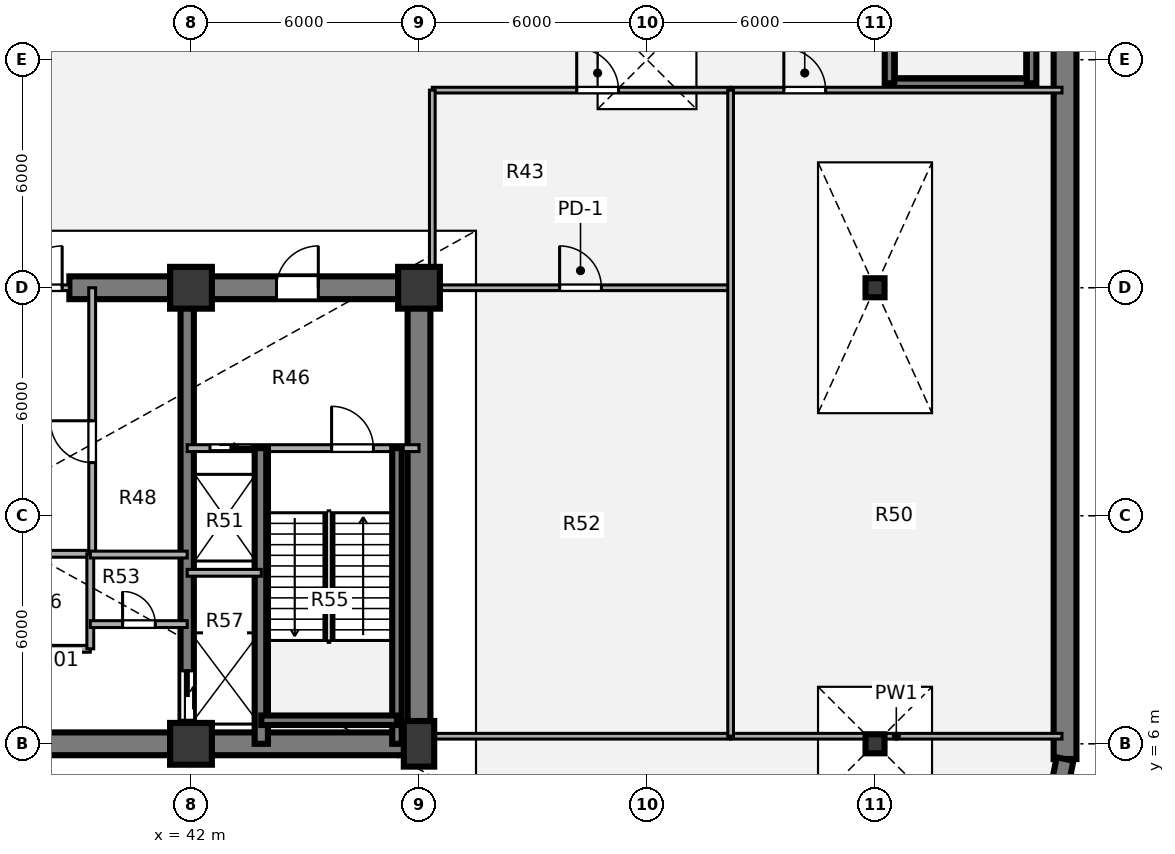
"""IFC4 building model, lengths in metres.
Left out: names, types, materials, properties, quantities, classifications, styles, units other than length and angle.
Written with IfcOpenShell. Run it as: python <this file> out.ifc"""

import sys

from ifc_helpers import new_model, si_unit, direction, frame, frame_2d, origin, origin_2d, place, context, subcontext, project, spatial, rectangle, i_section, extrude, source, transform, mapped, element, fill, save


model = new_model("IFC4")
c1 = context("Model", 3, precision=1e-05, world=origin(), true_north=direction((0.0, 1.0)))
c2 = subcontext(c1, "Body", "Model", "MODEL_VIEW")
j1 = project(units=[si_unit("LENGTHUNIT", "METRE"), si_unit("PLANEANGLEUNIT", "RADIAN")], contexts=[c1])
p1 = place(None, origin())
s1 = spatial("IfcSite", under=j1, at=p1, CompositionType="ELEMENT")
p2 = place(p1, origin())
s2 = spatial("IfcBuilding", under=s1, at=p2, CompositionType="ELEMENT")
p3 = place(p2, frame((0.0, 0.0, -4.86)))
s3 = spatial("IfcBuildingStorey", under=s2, at=p3, CompositionType="ELEMENT", Elevation=-4.86)
m1 = source(origin(), c2, "Body", "SweptSolid", [
    extrude(rectangle(XDim=1.1, YDim=1.1, at=origin_2d()), origin(), (0.0, 0.0, 1.0), 4.86),
])
p4 = place(p3, frame((42.0, 6.0, 0.0), z_axis=(0.0, 0.0, 1.0), x_axis=(1.0, 0.0, 0.0)))
e1 = element("IfcColumn", 1, at=p4, inside=s3, PredefinedType="COLUMN", context=c2, shape_type="MappedRepresentation", body=[
    mapped(m1, transform((0.0, 0.0, 0.0), x_axis=(1.0, 0.0, 0.0), y_axis=(0.0, 1.0, 0.0), z_axis=(0.0, 0.0, 1.0), scale=1.0)),
])
m2 = source(origin(), c2, "Body", "SweptSolid", [
    extrude(rectangle(XDim=0.8, YDim=1.2, at=origin_2d()), origin(), (0.0, 0.0, 1.0), 4.86),
])
p5 = place(p3, frame((48.0, 6.0, 0.0), z_axis=(0.0, 0.0, 1.0), x_axis=(1.0, 0.0, 0.0)))
e2 = element("IfcColumn", 2, at=p5, inside=s3, PredefinedType="COLUMN", context=c2, shape_type="MappedRepresentation", body=[
    mapped(m2, transform((0.0, 0.0, 0.0), x_axis=(1.0, 0.0, 0.0), y_axis=(0.0, 1.0, 0.0), z_axis=(0.0, 0.0, 1.0), scale=1.0)),
])
for number, where, z_axis, x_axis in (
    (3, (42.0, 18.0, 0.0), (0.0, 0.0, 1.0), (1.0, 0.0, 0.0)),
    (4, (48.0, 18.0, 0.0), (0.0, 0.0, 1.0), (1.0, 0.0, 0.0)),
):
    element("IfcColumn", number, at=place(p3, frame(where, z_axis=z_axis, x_axis=x_axis)), inside=s3, PredefinedType="COLUMN", context=c2, shape_type="MappedRepresentation", body=[
        mapped(m1, transform((0.0, 0.0, 0.0), x_axis=(1.0, 0.0, 0.0), y_axis=(0.0, 1.0, 0.0), z_axis=(0.0, 0.0, 1.0), scale=1.0)),
    ])
p6 = place(p3, frame((48.3, 6.0, 0.0), z_axis=(0.0, 0.0, 1.0), x_axis=(-1.0, 0.0, 0.0)))
e5 = element("IfcWall", 5, at=p6, inside=s3, PredefinedType="SHEAR", context=c2, shape_type="SweptSolid", body=[
    extrude(rectangle(XDim=24.6, YDim=0.6, at=frame_2d((12.3, 0.0))), origin(), (0.0, 0.0, 1.0), 4.86),
])
p7 = place(p3, frame((48.0, 18.0, 0.0), z_axis=(0.0, 0.0, 1.0), x_axis=(0.0, -1.0, 0.0)))
e6 = element("IfcWall", 6, at=p7, inside=s3, PredefinedType="SHEAR", context=c2, shape_type="SweptSolid", body=[
    extrude(rectangle(XDim=12.0, YDim=0.6, at=frame_2d((6.0, 0.0))), origin(), (0.0, 0.0, 1.0), 4.86),
])
p8 = place(p3, frame((38.8, 18.0, 0.0), z_axis=(0.0, 0.0, 1.0), x_axis=(1.0, 0.0, 0.0)))
e7 = element("IfcWall", 7, at=p8, inside=s3, PredefinedType="SHEAR", context=c2, shape_type="SweptSolid", body=[
    extrude(rectangle(XDim=9.5, YDim=0.6, at=frame_2d((4.75, 0.0))), origin(), (0.0, 0.0, 1.0), 4.86),
])
p9 = place(p8, frame((5.45, 0.0, 0.0)))
e8 = element("IfcOpeningElement", 8, at=p9, cuts=e7, PredefinedType="OPENING", context=c2, shape_type="SweptSolid", body=[
    extrude(rectangle(XDim=1.1, YDim=2.1, at=origin_2d()), frame((0.55, 0.31, 1.05), z_axis=(0.0, -1.0, 0.0), x_axis=(1.0, 0.0, 0.0)), (0.0, 0.0, 1.0), 0.62),
])
p10 = place(p3, frame((41.9, 18.0, 0.0), z_axis=(0.0, 0.0, 1.0), x_axis=(0.0, -1.0, 0.0)))
e9 = element("IfcWall", 9, at=p10, inside=s3, PredefinedType="SHEAR", context=c2, shape_type="SweptSolid", body=[
    extrude(rectangle(XDim=12.0, YDim=0.35, at=frame_2d((6.0, 0.0))), origin(), (0.0, 0.0, 1.0), 4.86),
])
p11 = place(p10, frame((10.08, 0.0, 0.0)))
e10 = element("IfcOpeningElement", 10, at=p11, cuts=e9, PredefinedType="OPENING", context=c2, shape_type="SweptSolid", body=[
    extrude(rectangle(XDim=1.3, YDim=2.1, at=origin_2d()), frame((0.65, 0.185, 1.05), z_axis=(0.0, -1.0, 0.0), x_axis=(1.0, 0.0, 0.0)), (0.0, 0.0, 1.0), 0.37),
])
p12 = place(p3, frame((65.0, 55.4, 0.0), z_axis=(0.0, 0.0, 1.0), x_axis=(0.0, -1.0, 0.0)))
e11 = element("IfcWall", 11, at=p12, inside=s3, PredefinedType="USERDEFINED", context=c2, shape_type="SweptSolid", body=[
    extrude(rectangle(XDim=49.8, YDim=0.6, at=frame_2d((24.9, 0.0))), origin(), (0.0, 0.0, 1.0), 4.86),
])
p13 = place(p3, frame((65.0, 5.6, 0.0), z_axis=(0.0, 0.0, 1.0), x_axis=(-0.195138390419, -0.980775717779, 0.0)))
e12 = element("IfcWall", 12, at=p13, inside=s3, PredefinedType="USERDEFINED", context=c2, shape_type="SweptSolid", body=[
    extrude(rectangle(XDim=1.249, YDim=0.45, at=frame_2d((0.624, 0.0))), origin(), (0.0, 0.0, 1.0), 4.86),
])
m3 = source(origin(), c2, "Body", "SweptSolid", [
    extrude(i_section(OverallWidth=0.5, OverallDepth=0.5, WebThickness=0.028, FlangeThickness=0.045, at=origin_2d()), origin(), (0.0, 0.0, 1.0), 4.86),
])
for number, where, z_axis, x_axis in (
    (13, (60.0, 6.0, 0.0), (0.0, 0.0, 1.0), (1.0, 0.0, 0.0)),
    (14, (60.0, 18.0, 0.0), (0.0, 0.0, 1.0), (1.0, 0.0, 0.0)),
):
    element("IfcColumn", number, at=place(p3, frame(where, z_axis=z_axis, x_axis=x_axis)), inside=s3, PredefinedType="COLUMN", context=c2, shape_type="MappedRepresentation", body=[
        mapped(m3, transform((0.0, 0.0, 0.0), x_axis=(1.0, 0.0, 0.0), y_axis=(0.0, 1.0, 0.0), z_axis=(0.0, 0.0, 1.0), scale=1.0)),
    ])
p14 = place(p3, frame((60.38, 23.38, 0.0), z_axis=(0.0, 0.0, 1.0), x_axis=(1.0, 0.0, 0.0)))
e15 = element("IfcWall", 15, at=p14, inside=s3, PredefinedType="SHEAR", context=c2, shape_type="SweptSolid", body=[
    extrude(rectangle(XDim=3.74, YDim=0.25, at=frame_2d((1.87, 0.0))), origin(), (0.0, 0.0, 1.0), 4.86),
])
for number, where, z_axis, x_axis in (
    (16, (60.38, 23.38, 0.0), (0.0, 0.0, 1.0), (0.0, 1.0, 0.0)),
    (17, (64.12, 23.38, 0.0), (0.0, 0.0, 1.0), (0.0, 1.0, 0.0)),
):
    element("IfcWall", number, at=place(p3, frame(where, z_axis=z_axis, x_axis=x_axis)), inside=s3, PredefinedType="SHEAR", context=c2, shape_type="SweptSolid", body=[
        extrude(rectangle(XDim=7.47, YDim=0.25, at=frame_2d((3.735, 0.0))), origin(), (0.0, 0.0, 1.0), 4.86),
    ])
p15 = place(p3, frame((34.2, 11.0, 0.0), z_axis=(0.0, 0.0, 1.0), x_axis=(1.0, 0.0, 0.0)))
e18 = element("IfcWall", 18, at=p15, inside=s3, PredefinedType="PARTITIONING", context=c2, shape_type="SweptSolid", body=[
    extrude(rectangle(XDim=5.15, YDim=0.18, at=frame_2d((2.575, 0.0))), origin(), (0.0, 0.0, 1.0), 4.51),
])
p16 = place(p15, frame((2.0, 0.0, 0.0)))
e19 = element("IfcOpeningElement", 19, at=p16, cuts=e18, PredefinedType="OPENING", context=c2, shape_type="SweptSolid", body=[
    extrude(rectangle(XDim=1.1, YDim=2.1, at=origin_2d()), frame((0.55, 0.1, 1.05), z_axis=(0.0, -1.0, 0.0), x_axis=(1.0, 0.0, 0.0)), (0.0, 0.0, 1.0), 0.2),
])
p17 = place(p3, frame((34.2, 8.5, 0.0), z_axis=(0.0, 0.0, 1.0), x_axis=(1.0, 0.0, 0.0)))
e20 = element("IfcWall", 20, at=p17, inside=s3, PredefinedType="PARTITIONING", context=c2, shape_type="SweptSolid", body=[
    extrude(rectangle(XDim=5.15, YDim=0.18, at=frame_2d((2.575, 0.0))), origin(), (0.0, 0.0, 1.0), 4.51),
])
p18 = place(p3, frame((39.35, 8.5, 0.0), z_axis=(0.0, 0.0, 1.0), x_axis=(0.0, 1.0, 0.0)))
e21 = element("IfcWall", 21, at=p18, inside=s3, PredefinedType="PARTITIONING", context=c2, shape_type="SweptSolid", body=[
    extrude(rectangle(XDim=2.5, YDim=0.18, at=frame_2d((1.25, 0.0))), origin(), (0.0, 0.0, 1.0), 4.51),
])
p19 = place(p3, frame((39.4, 11.0, 0.0), z_axis=(0.0, 0.0, 1.0), x_axis=(0.0, 1.0, 0.0)))
e22 = element("IfcWall", 22, at=p19, inside=s3, PredefinedType="PARTITIONING", context=c2, shape_type="SweptSolid", body=[
    extrude(rectangle(XDim=7.0, YDim=0.18, at=frame_2d((3.5, 0.0))), origin(), (0.0, 0.0, 1.0), 4.51),
])
p20 = place(p19, frame((2.4, 0.0, 0.0)))
e23 = element("IfcOpeningElement", 23, at=p20, cuts=e22, PredefinedType="OPENING", context=c2, shape_type="SweptSolid", body=[
    extrude(rectangle(XDim=1.1, YDim=2.1, at=origin_2d()), frame((0.55, 0.1, 1.05), z_axis=(0.0, -1.0, 0.0), x_axis=(1.0, 0.0, 0.0)), (0.0, 0.0, 1.0), 0.2),
])
p21 = place(p3, frame((39.35, 10.98, 0.0), z_axis=(0.0, 0.0, 1.0), x_axis=(1.0, 0.0, 0.0)))
e24 = element("IfcWall", 24, at=p21, inside=s3, PredefinedType="PARTITIONING", context=c2, shape_type="SweptSolid", body=[
    extrude(rectangle(XDim=2.55, YDim=0.18, at=frame_2d((1.275, 0.0))), origin(), (0.0, 0.0, 1.0), 4.51),
])
p22 = place(p3, frame((39.35, 9.15, 0.0), z_axis=(0.0, 0.0, 1.0), x_axis=(1.0, 0.0, 0.0)))
e25 = element("IfcWall", 25, at=p22, inside=s3, PredefinedType="PARTITIONING", context=c2, shape_type="SweptSolid", body=[
    extrude(rectangle(XDim=2.55, YDim=0.18, at=frame_2d((1.275, 0.0))), origin(), (0.0, 0.0, 1.0), 4.51),
])
p23 = place(p22, frame((0.85, 0.0, 0.0)))
e26 = element("IfcOpeningElement", 26, at=p23, cuts=e25, PredefinedType="OPENING", context=c2, shape_type="SweptSolid", body=[
    extrude(rectangle(XDim=0.86, YDim=2.1, at=origin_2d()), frame((0.43, 0.1, 1.05), z_axis=(0.0, -1.0, 0.0), x_axis=(1.0, 0.0, 0.0)), (0.0, 0.0, 1.0), 0.2),
])
p24 = place(p3, frame((33.2, 18.0, 0.0), z_axis=(0.0, 0.0, 1.0), x_axis=(1.0, 0.0, 0.0)))
e27 = element("IfcWall", 27, at=p24, inside=s3, PredefinedType="PARTITIONING", context=c2, shape_type="SweptSolid", body=[
    extrude(rectangle(XDim=5.6, YDim=0.15, at=frame_2d((2.8, 0.0))), origin(), (0.0, 0.0, 1.0), 3.325),
])
p25 = place(p24, frame((0.19, 0.0, 0.0)))
e28 = element("IfcOpeningElement", 28, at=p25, cuts=e27, PredefinedType="OPENING", context=c2, shape_type="SweptSolid", body=[
    extrude(rectangle(XDim=1.1, YDim=2.1, at=origin_2d()), frame((0.55, 0.085, 1.05), z_axis=(0.0, -1.0, 0.0), x_axis=(1.0, 0.0, 0.0)), (0.0, 0.0, 1.0), 0.17),
])
p26 = place(p24, frame((4.31, 0.0, 0.0)))
e29 = element("IfcOpeningElement", 29, at=p26, cuts=e27, PredefinedType="OPENING", context=c2, shape_type="SweptSolid", body=[
    extrude(rectangle(XDim=1.1, YDim=2.1, at=origin_2d()), frame((0.55, 0.085, 1.05), z_axis=(0.0, -1.0, 0.0), x_axis=(1.0, 0.0, 0.0)), (0.0, 0.0, 1.0), 0.17),
])
p27 = place(p3, frame((41.9, 13.78, 0.0), z_axis=(0.0, 0.0, 1.0), x_axis=(1.0, 0.0, 0.0)))
e30 = element("IfcWall", 30, at=p27, inside=s3, PredefinedType="PARTITIONING", context=c2, shape_type="SweptSolid", body=[
    extrude(rectangle(XDim=6.1, YDim=0.18, at=frame_2d((3.05, 0.0))), origin(), (0.0, 0.0, 1.0), 4.51),
])
p28 = place(p27, frame((0.6, 0.0, 0.0)))
e31 = element("IfcOpeningElement", 31, at=p28, cuts=e30, PredefinedType="OPENING", context=c2, shape_type="SweptSolid", body=[
    extrude(rectangle(XDim=1.1, YDim=2.1, at=origin_2d()), frame((0.55, 0.1, 1.05), z_axis=(0.0, -1.0, 0.0), x_axis=(1.0, 0.0, 0.0)), (0.0, 0.0, 1.0), 0.2),
])
p29 = place(p27, frame((3.8, 0.0, 0.0)))
e32 = element("IfcOpeningElement", 32, at=p29, cuts=e30, PredefinedType="OPENING", context=c2, shape_type="SweptSolid", body=[
    extrude(rectangle(XDim=1.1, YDim=2.1, at=origin_2d()), frame((0.55, 0.1, 1.05), z_axis=(0.0, -1.0, 0.0), x_axis=(1.0, 0.0, 0.0)), (0.0, 0.0, 1.0), 0.2),
])
p30 = place(p3, frame((43.85, 6.0, 0.0), z_axis=(0.0, 0.0, 1.0), x_axis=(0.0, 1.0, 0.0)))
e33 = element("IfcWall", 33, at=p30, inside=s3, PredefinedType="SHEAR", context=c2, shape_type="SweptSolid", body=[
    extrude(rectangle(XDim=7.78, YDim=0.35, at=frame_2d((3.89, 0.0))), origin(), (0.0, 0.0, 1.0), 4.86),
])
p31 = place(p3, frame((47.42, 6.0, 0.0), z_axis=(0.0, 0.0, 1.0), x_axis=(0.0, 1.0, 0.0)))
e34 = element("IfcWall", 34, at=p31, inside=s3, PredefinedType="SHEAR", context=c2, shape_type="SweptSolid", body=[
    extrude(rectangle(XDim=7.78, YDim=0.25, at=frame_2d((3.89, 0.0))), origin(), (0.0, 0.0, 1.0), 4.86),
])
p32 = place(p3, frame((43.85, 6.62, 0.0), z_axis=(0.0, 0.0, 1.0), x_axis=(1.0, 0.0, 0.0)))
e35 = element("IfcWall", 35, at=p32, inside=s3, PredefinedType="SHEAR", context=c2, shape_type="SweptSolid", body=[
    extrude(rectangle(XDim=3.57, YDim=0.25, at=frame_2d((1.785, 0.0))), origin(), (0.0, 0.0, 1.0), 4.86),
])
p33 = place(p3, frame((41.9, 10.5, 0.0), z_axis=(0.0, 0.0, 1.0), x_axis=(1.0, 0.0, 0.0)))
e36 = element("IfcWall", 36, at=p33, inside=s3, PredefinedType="PARTITIONING", context=c2, shape_type="SweptSolid", body=[
    extrude(rectangle(XDim=1.95, YDim=0.18, at=frame_2d((0.975, 0.0))), origin(), (0.0, 0.0, 1.0), 4.51),
])
p34 = place(p3, frame((48.35, 6.2, 0.0), z_axis=(0.0, 0.0, 1.0), x_axis=(1.0, 0.0, 0.0)))
e37 = element("IfcWall", 37, at=p34, inside=s3, PredefinedType="PARTITIONING", context=c2, shape_type="SweptSolid", body=[
    extrude(rectangle(XDim=7.85, YDim=0.15, at=frame_2d((3.925, 0.0))), origin(), (0.0, 0.0, 1.0), 3.625),
])
p35 = place(p3, frame((56.2, 6.2, 0.0), z_axis=(0.0, 0.0, 1.0), x_axis=(1.0, 0.0, 0.0)))
e38 = element("IfcWall", 38, at=p35, inside=s3, PredefinedType="PARTITIONING", context=c2, shape_type="SweptSolid", body=[
    extrude(rectangle(XDim=8.72, YDim=0.15, at=frame_2d((4.36, 0.0))), origin(), (0.0, 0.0, 1.0), 3.625),
])
p36 = place(p3, frame((48.35, 18.0, 0.0), z_axis=(0.0, 0.0, 1.0), x_axis=(1.0, 0.0, 0.0)))
e39 = element("IfcWall", 39, at=p36, inside=s3, PredefinedType="PARTITIONING", context=c2, shape_type="SweptSolid", body=[
    extrude(rectangle(XDim=7.85, YDim=0.15, at=frame_2d((3.925, 0.0))), origin(), (0.0, 0.0, 1.0), 3.625),
])
p37 = place(p36, frame((3.35, 0.0, 0.0)))
e40 = element("IfcOpeningElement", 40, at=p37, cuts=e39, PredefinedType="OPENING", context=c2, shape_type="SweptSolid", body=[
    extrude(rectangle(XDim=1.1, YDim=2.1, at=origin_2d()), frame((0.55, 0.085, 1.05), z_axis=(0.0, -1.0, 0.0), x_axis=(1.0, 0.0, 0.0)), (0.0, 0.0, 1.0), 0.17),
])
p38 = place(p3, frame((48.35, 23.2, 0.0), z_axis=(0.0, 0.0, 1.0), x_axis=(1.0, 0.0, 0.0)))
e41 = element("IfcWall", 41, at=p38, inside=s3, PredefinedType="PARTITIONING", context=c2, shape_type="SweptSolid", body=[
    extrude(rectangle(XDim=7.85, YDim=0.15, at=frame_2d((3.925, 0.0))), origin(), (0.0, 0.0, 1.0), 4.51),
])
p39 = place(p38, frame((3.8, 0.0, 0.0)))
e42 = element("IfcOpeningElement", 42, at=p39, cuts=e41, PredefinedType="OPENING", context=c2, shape_type="SweptSolid", body=[
    extrude(rectangle(XDim=1.1, YDim=2.1, at=origin_2d()), frame((0.55, 0.085, 1.05), z_axis=(0.0, -1.0, 0.0), x_axis=(1.0, 0.0, 0.0)), (0.0, 0.0, 1.0), 0.17),
])
p40 = place(p3, frame((56.2, 23.2, 0.0), z_axis=(0.0, 0.0, 1.0), x_axis=(1.0, 0.0, 0.0)))
e43 = element("IfcWall", 43, at=p40, inside=s3, PredefinedType="PARTITIONING", context=c2, shape_type="SweptSolid", body=[
    extrude(rectangle(XDim=8.72, YDim=0.15, at=frame_2d((4.36, 0.0))), origin(), (0.0, 0.0, 1.0), 4.51),
])
p41 = place(p40, frame((1.4, 0.0, 0.0)))
e44 = element("IfcOpeningElement", 44, at=p41, cuts=e43, PredefinedType="OPENING", context=c2, shape_type="SweptSolid", body=[
    extrude(rectangle(XDim=1.1, YDim=2.1, at=origin_2d()), frame((0.55, 0.085, 1.05), z_axis=(0.0, -1.0, 0.0), x_axis=(1.0, 0.0, 0.0)), (0.0, 0.0, 1.0), 0.17),
])
p42 = place(p3, frame((48.35, 18.0, 0.0), z_axis=(0.0, 0.0, 1.0), x_axis=(0.0, 1.0, 0.0)))
e45 = element("IfcWall", 45, at=p42, inside=s3, PredefinedType="PARTITIONING", context=c2, shape_type="SweptSolid", body=[
    extrude(rectangle(XDim=5.2, YDim=0.15, at=frame_2d((2.6, 0.0))), origin(), (0.0, 0.0, 1.0), 4.51),
])
p43 = place(p3, frame((56.2, 6.2, 0.0), z_axis=(0.0, 0.0, 1.0), x_axis=(0.0, 1.0, 0.0)))
e46 = element("IfcWall", 46, at=p43, inside=s3, PredefinedType="PARTITIONING", context=c2, shape_type="SweptSolid", body=[
    extrude(rectangle(XDim=17.0, YDim=0.15, at=frame_2d((8.5, 0.0))), origin(), (0.0, 0.0, 1.0), 4.218),
])
m4 = source(origin(), c2, "Body", "SweptSolid", [
    extrude(rectangle(XDim=1.1, YDim=2.1, at=origin_2d()), frame((0.55, 0.025, 1.05), z_axis=(0.0, -1.0, 0.0), x_axis=(1.0, 0.0, 0.0)), (0.0, 0.0, 1.0), 0.05),
])
p44 = place(p20, origin())
e47 = element("IfcDoor", 47, at=p44, inside=s3, OperationType="SINGLE_SWING_RIGHT", PredefinedType="DOOR", context=c2, shape_type="MappedRepresentation", body=[
    mapped(m4, transform((0.0, 0.0, 0.0), x_axis=(1.0, 0.0, 0.0), y_axis=(0.0, 1.0, 0.0), z_axis=(0.0, 0.0, 1.0), scale=1.0)),
])
fill(e23, e47)
m5 = source(origin(), c2, "Body", "SweptSolid", [
    extrude(rectangle(XDim=0.86, YDim=2.1, at=origin_2d()), frame((0.43, 0.025, 1.05), z_axis=(0.0, -1.0, 0.0), x_axis=(1.0, 0.0, 0.0)), (0.0, 0.0, 1.0), 0.05),
])
p45 = place(p23, origin())
e48 = element("IfcDoor", 48, at=p45, inside=s3, OperationType="SINGLE_SWING_LEFT", PredefinedType="DOOR", context=c2, shape_type="MappedRepresentation", body=[
    mapped(m5, transform((0.0, 0.0, 0.0), x_axis=(1.0, 0.0, 0.0), y_axis=(0.0, 1.0, 0.0), z_axis=(0.0, 0.0, 1.0), scale=1.0)),
])
fill(e26, e48)
m6 = source(origin(), c2, "Body", "SweptSolid", [
    extrude(rectangle(XDim=1.1, YDim=2.1, at=origin_2d()), frame((0.55, 0.025, 1.05), z_axis=(0.0, -1.0, 0.0), x_axis=(1.0, 0.0, 0.0)), (0.0, 0.0, 1.0), 0.05),
])
p46 = place(p26, origin())
e49 = element("IfcDoor", 49, at=p46, inside=s3, OperationType="SINGLE_SWING_RIGHT", PredefinedType="DOOR", context=c2, shape_type="MappedRepresentation", body=[
    mapped(m6, transform((0.0, 0.0, 0.0), x_axis=(1.0, 0.0, 0.0), y_axis=(0.0, 1.0, 0.0), z_axis=(0.0, 0.0, 1.0), scale=1.0)),
])
fill(e29, e49)
m7 = source(origin(), c2, "Body", "SweptSolid", [
    extrude(rectangle(XDim=1.1, YDim=2.1, at=origin_2d()), frame((0.55, 0.025, 1.05), z_axis=(0.0, -1.0, 0.0), x_axis=(1.0, 0.0, 0.0)), (0.0, 0.0, 1.0), 0.05),
])
p47 = place(p28, origin())
e50 = element("IfcDoor", 50, at=p47, inside=s3, OperationType="SLIDING_TO_RIGHT", PredefinedType="DOOR", context=c2, shape_type="MappedRepresentation", body=[
    mapped(m7, transform((0.0, 0.0, 0.0), x_axis=(1.0, 0.0, 0.0), y_axis=(0.0, 1.0, 0.0), z_axis=(0.0, 0.0, 1.0), scale=1.0)),
])
fill(e31, e50)
m8 = source(origin(), c2, "Body", "SweptSolid", [
    extrude(rectangle(XDim=1.1, YDim=2.1, at=origin_2d()), frame((0.55, 0.025, 1.05), z_axis=(0.0, -1.0, 0.0), x_axis=(1.0, 0.0, 0.0)), (0.0, 0.0, 1.0), 0.05),
])
p48 = place(p29, origin())
e51 = element("IfcDoor", 51, at=p48, inside=s3, OperationType="SINGLE_SWING_LEFT", PredefinedType="DOOR", context=c2, shape_type="MappedRepresentation", body=[
    mapped(m8, transform((0.0, 0.0, 0.0), x_axis=(1.0, 0.0, 0.0), y_axis=(0.0, 1.0, 0.0), z_axis=(0.0, 0.0, 1.0), scale=1.0)),
])
fill(e32, e51)
m9 = source(origin(), c2, "Body", "SweptSolid", [
    extrude(rectangle(XDim=1.3, YDim=2.1, at=origin_2d()), frame((0.65, 0.025, 1.05), z_axis=(0.0, -1.0, 0.0), x_axis=(1.0, 0.0, 0.0)), (0.0, 0.0, 1.0), 0.05),
])
p49 = place(p11, origin())
e52 = element("IfcDoor", 52, at=p49, inside=s3, OperationType="SLIDING_TO_LEFT", PredefinedType="DOOR", context=c2, shape_type="MappedRepresentation", body=[
    mapped(m9, transform((0.0, 0.0, 0.0), x_axis=(1.0, 0.0, 0.0), y_axis=(0.0, 1.0, 0.0), z_axis=(0.0, 0.0, 1.0), scale=1.0)),
])
fill(e10, e52)
p50 = place(p9, origin())
e53 = element("IfcDoor", 53, at=p50, inside=s3, OperationType="SINGLE_SWING_RIGHT", PredefinedType="DOOR", context=c2, shape_type="MappedRepresentation", body=[
    mapped(m6, transform((0.0, 0.0, 0.0), x_axis=(1.0, 0.0, 0.0), y_axis=(0.0, 1.0, 0.0), z_axis=(0.0, 0.0, 1.0), scale=1.0)),
])
fill(e8, e53)
p51 = place(p37, origin())
e54 = element("IfcDoor", 54, at=p51, inside=s3, OperationType="SINGLE_SWING_LEFT", PredefinedType="DOOR", context=c2, shape_type="MappedRepresentation", body=[
    mapped(m4, transform((0.0, 0.0, 0.0), x_axis=(1.0, 0.0, 0.0), y_axis=(0.0, 1.0, 0.0), z_axis=(0.0, 0.0, 1.0), scale=1.0)),
])
fill(e40, e54)
p52 = place(p39, origin())
e55 = element("IfcDoor", 55, at=p52, inside=s3, OperationType="SINGLE_SWING_LEFT", PredefinedType="DOOR", context=c2, shape_type="MappedRepresentation", body=[
    mapped(m4, transform((0.0, 0.0, 0.0), x_axis=(1.0, 0.0, 0.0), y_axis=(0.0, 1.0, 0.0), z_axis=(0.0, 0.0, 1.0), scale=1.0)),
])
fill(e42, e55)
p53 = place(p41, origin())
e56 = element("IfcDoor", 56, at=p53, inside=s3, OperationType="SINGLE_SWING_LEFT", PredefinedType="DOOR", context=c2, shape_type="MappedRepresentation", body=[
    mapped(m4, transform((0.0, 0.0, 0.0), x_axis=(1.0, 0.0, 0.0), y_axis=(0.0, 1.0, 0.0), z_axis=(0.0, 0.0, 1.0), scale=1.0)),
])
fill(e44, e56)
save(model, sys.argv[1])
